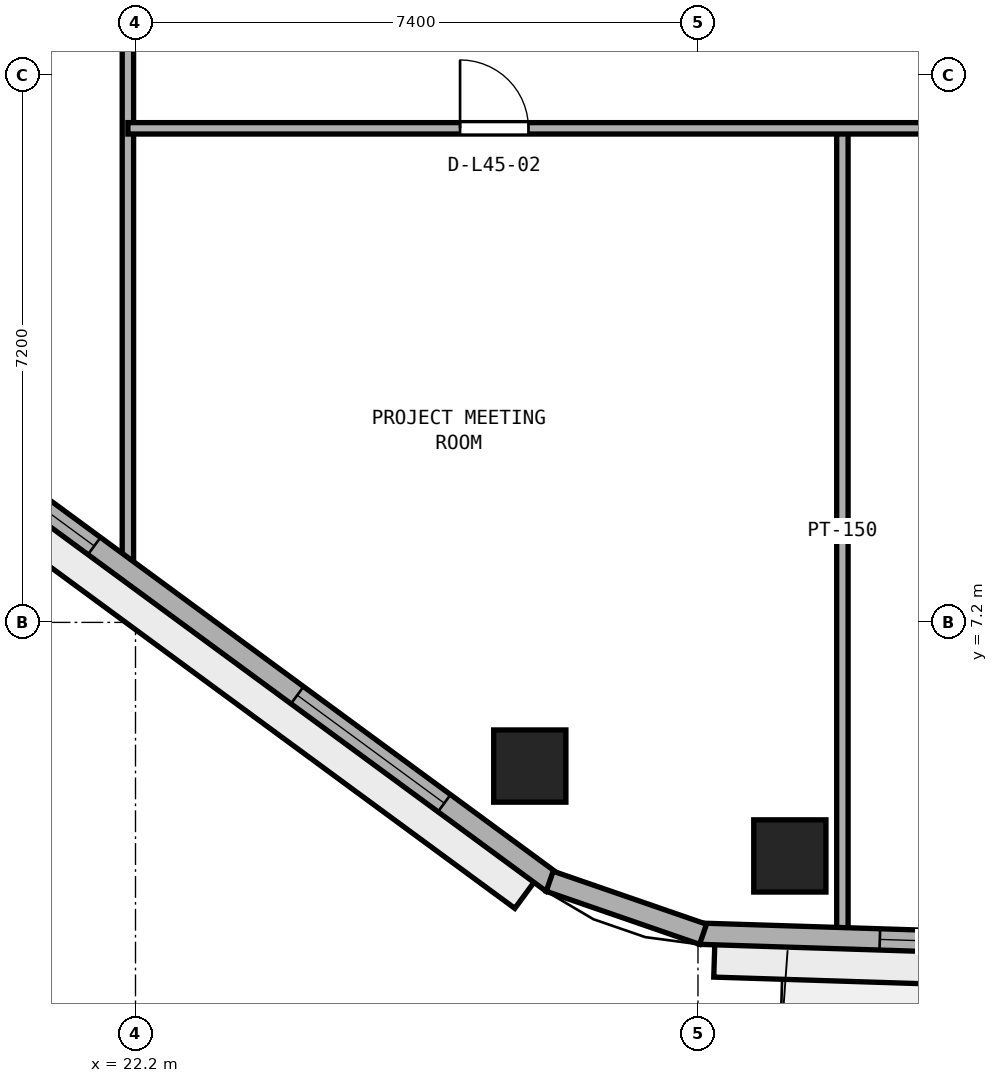
"""IFC4 building model, lengths in metres.
Left out: names, types, materials, properties, quantities, classifications, styles, units other than length and angle.
Written with IfcOpenShell. Run it as: python <this file> out.ifc"""

import sys

from ifc_helpers import new_model, si_unit, direction, frame, frame_2d, origin, origin_2d, place, context, subcontext, project, spatial, rectangle, extrude, element, fill, save


model = new_model("IFC4")
c1 = context("Model", 3, precision=1e-05, world=origin(), true_north=direction((0.0, 1.0)))
c2 = subcontext(c1, "Body", "Model", "MODEL_VIEW")
j1 = project(units=[si_unit("LENGTHUNIT", "METRE"), si_unit("PLANEANGLEUNIT", "RADIAN")], contexts=[c1])
p1 = place(None, origin())
s1 = spatial("IfcSite", under=j1, at=p1, CompositionType="ELEMENT")
p2 = place(p1, origin())
s2 = spatial("IfcBuilding", under=s1, at=p2, CompositionType="ELEMENT")
p3 = place(p2, frame((0.0, 0.0, 178.2)))
s3 = spatial("IfcBuildingStorey", under=s2, at=p3, CompositionType="ELEMENT", Elevation=178.2)
for number, where, z_axis, x_axis in (
    (1, (30.809, 4.127, 0.0), (0.0, 0.0, 1.0), (1.0, 0.0, 0.0)),
    (2, (27.387, 5.31, 0.0), (0.0, 0.0, 1.0), (1.0, 0.0, 0.0)),
):
    element("IfcColumn", number, at=place(p3, frame(where, z_axis=z_axis, x_axis=x_axis)), inside=s3, PredefinedType="COLUMN", context=c2, shape_type="SweptSolid", body=[
        extrude(rectangle(XDim=0.95, YDim=0.95, at=origin_2d()), origin(), (0.0, 0.0, 1.0), 3.8),
    ])
p4 = place(p3, frame((31.5, 3.11, 0.0), z_axis=(0.0, 0.0, 1.0), x_axis=(0.0, 1.0, 0.0)))
e3 = element("IfcWall", 3, at=p4, inside=s3, PredefinedType="PARTITIONING", context=c2, shape_type="SweptSolid", body=[
    extrude(rectangle(XDim=10.59, YDim=0.15, at=frame_2d((5.295, 0.0))), origin(), (0.0, 0.0, 1.0), 3.54),
])
p5 = place(p3, frame((22.1, 7.846, 0.0), z_axis=(0.0, 0.0, 1.0), x_axis=(0.0, 1.0, 0.0)))
e4 = element("IfcWall", 4, at=p5, inside=s3, PredefinedType="PARTITIONING", context=c2, shape_type="SweptSolid", body=[
    extrude(rectangle(XDim=16.004, YDim=0.15, at=frame_2d((8.002, 0.0))), origin(), (0.0, 0.0, 1.0), 3.54),
])
p6 = place(p5, frame((10.359, 0.0, 0.0)))
e5 = element("IfcOpeningElement", 5, at=p6, cuts=e4, PredefinedType="OPENING", context=c2, shape_type="SweptSolid", body=[
    extrude(rectangle(XDim=0.9, YDim=2.1, at=frame_2d((0.45, 1.05))), frame((0.0, 0.085, 0.0), z_axis=(0.0, -1.0, 0.0), x_axis=(1.0, 0.0, 0.0)), (0.0, 0.0, 1.0), 0.17),
])
p7 = place(p3, frame((22.1, 13.7, 0.0), z_axis=(0.0, 0.0, 1.0), x_axis=(1.0, 0.0, 0.0)))
e6 = element("IfcWall", 6, at=p7, inside=s3, PredefinedType="PARTITIONING", context=c2, shape_type="SweptSolid", body=[
    extrude(rectangle(XDim=12.3, YDim=0.15, at=frame_2d((6.15, 0.0))), origin(), (0.0, 0.0, 1.0), 3.54),
])
p8 = place(p7, frame((4.37, 0.0, 0.0)))
e7 = element("IfcOpeningElement", 7, at=p8, cuts=e6, PredefinedType="OPENING", context=c2, shape_type="SweptSolid", body=[
    extrude(rectangle(XDim=0.9, YDim=2.1, at=frame_2d((0.45, 1.05))), frame((0.0, 0.085, 0.0), z_axis=(0.0, -1.0, 0.0), x_axis=(1.0, 0.0, 0.0)), (0.0, 0.0, 1.0), 0.17),
])
p9 = place(p3, frame((29.625, 3.104, 0.0), z_axis=(0.0, 0.0, 1.0), x_axis=(0.99949718661, -0.031707632487, 0.0)))
e8 = element("IfcWall", 8, at=p9, inside=s3, PredefinedType="STANDARD", context=c2, shape_type="SweptSolid", body=[
    extrude(rectangle(XDim=16.408, YDim=0.28, at=frame_2d((8.204, 0.0))), origin(), (0.0, 0.0, 1.0), 3.54),
])
p10 = place(p9, frame((7.654, 0.0, 0.0)))
e9 = element("IfcOpeningElement", 9, at=p10, cuts=e8, PredefinedType="OPENING", context=c2, shape_type="SweptSolid", body=[
    extrude(rectangle(XDim=1.1, YDim=2.2, at=frame_2d((0.55, 1.1))), frame((0.0, 0.15, 0.0), z_axis=(0.0, -1.0, 0.0), x_axis=(1.0, 0.0, 0.0)), (0.0, 0.0, 1.0), 0.3),
])
p11 = place(p9, frame((2.368, 0.0, 0.9)))
e10 = element("IfcOpeningElement", 10, at=p11, cuts=e8, PredefinedType="OPENING", context=c2, shape_type="SweptSolid", body=[
    extrude(rectangle(XDim=2.4, YDim=1.75, at=frame_2d((1.2, 0.875))), frame((0.0, 0.15, 0.0), z_axis=(0.0, -1.0, 0.0), x_axis=(1.0, 0.0, 0.0)), (0.0, 0.0, 1.0), 0.3),
])
p12 = place(p9, frame((12.14, 0.0, 0.9)))
e11 = element("IfcOpeningElement", 11, at=p12, cuts=e8, PredefinedType="OPENING", context=c2, shape_type="SweptSolid", body=[
    extrude(rectangle(XDim=2.4, YDim=1.75, at=frame_2d((1.2, 0.875))), frame((0.0, 0.15, 0.0), z_axis=(0.0, -1.0, 0.0), x_axis=(1.0, 0.0, 0.0)), (0.0, 0.0, 1.0), 0.3),
])
p13 = place(p3, frame((14.951, 13.134, 0.0), z_axis=(0.0, 0.0, 1.0), x_axis=(0.805804940328, -0.592181051827, 0.0)))
e12 = element("IfcWall", 12, at=p13, inside=s3, PredefinedType="STANDARD", context=c2, shape_type="SweptSolid", body=[
    extrude(rectangle(XDim=15.804, YDim=0.28, at=frame_2d((7.902, 0.0))), origin(), (0.0, 0.0, 1.0), 3.54),
])
p14 = place(p13, frame((1.767, 0.0, 0.9)))
e13 = element("IfcOpeningElement", 13, at=p14, cuts=e12, PredefinedType="OPENING", context=c2, shape_type="SweptSolid", body=[
    extrude(rectangle(XDim=2.4, YDim=1.75, at=frame_2d((1.2, 0.875))), frame((0.0, 0.15, 0.0), z_axis=(0.0, -1.0, 0.0), x_axis=(1.0, 0.0, 0.0)), (0.0, 0.0, 1.0), 0.3),
])
p15 = place(p13, frame((5.922, 0.0, 0.9)))
e14 = element("IfcOpeningElement", 14, at=p15, cuts=e12, PredefinedType="OPENING", context=c2, shape_type="SweptSolid", body=[
    extrude(rectangle(XDim=2.4, YDim=1.75, at=frame_2d((1.2, 0.875))), frame((0.0, 0.15, 0.0), z_axis=(0.0, -1.0, 0.0), x_axis=(1.0, 0.0, 0.0)), (0.0, 0.0, 1.0), 0.3),
])
p16 = place(p13, frame((11.637, 0.0, 0.9)))
e15 = element("IfcOpeningElement", 15, at=p16, cuts=e12, PredefinedType="OPENING", context=c2, shape_type="SweptSolid", body=[
    extrude(rectangle(XDim=2.4, YDim=1.75, at=frame_2d((1.2, 0.875))), frame((0.0, 0.15, 0.0), z_axis=(0.0, -1.0, 0.0), x_axis=(1.0, 0.0, 0.0)), (0.0, 0.0, 1.0), 0.3),
])
p17 = place(p3, frame((27.649, 3.794, 0.0), z_axis=(0.0, 0.0, 1.0), x_axis=(0.945149124969, -0.326639145802, 0.0)))
e16 = element("IfcWall", 16, at=p17, inside=s3, PredefinedType="STANDARD", context=c2, shape_type="SweptSolid", body=[
    extrude(rectangle(XDim=2.135, YDim=0.28, at=frame_2d((1.067, 0.0))), origin(), (0.0, 0.0, 1.0), 3.54),
])
p18 = place(p8, origin())
e17 = element("IfcDoor", 17, at=p18, inside=s3, OperationType="SINGLE_SWING_LEFT", PredefinedType="DOOR", context=c2, shape_type="SweptSolid", body=[
    extrude(rectangle(XDim=0.9, YDim=2.1, at=frame_2d((0.45, 1.05))), frame((0.0, 0.025, 0.0), z_axis=(0.0, -1.0, 0.0), x_axis=(1.0, 0.0, 0.0)), (0.0, 0.0, 1.0), 0.05),
])
fill(e7, e17)
p19 = place(p11, origin())
e18 = element("IfcWindow", 18, at=p19, inside=s3, PartitioningType="SINGLE_PANEL", PredefinedType="WINDOW", context=c2, shape_type="SweptSolid", body=[
    extrude(rectangle(XDim=2.4, YDim=1.75, at=frame_2d((1.2, 0.875))), frame((0.0, 0.03, 0.0), z_axis=(0.0, -1.0, 0.0), x_axis=(1.0, 0.0, 0.0)), (0.0, 0.0, 1.0), 0.06),
])
fill(e10, e18)
p20 = place(p15, origin())
e19 = element("IfcWindow", 19, at=p20, inside=s3, PartitioningType="SINGLE_PANEL", PredefinedType="WINDOW", context=c2, shape_type="SweptSolid", body=[
    extrude(rectangle(XDim=2.4, YDim=1.75, at=frame_2d((1.2, 0.875))), frame((0.0, 0.03, 0.0), z_axis=(0.0, -1.0, 0.0), x_axis=(1.0, 0.0, 0.0)), (0.0, 0.0, 1.0), 0.06),
])
fill(e14, e19)
p21 = place(p16, origin())
e20 = element("IfcWindow", 20, at=p21, inside=s3, PartitioningType="SINGLE_PANEL", PredefinedType="WINDOW", context=c2, shape_type="SweptSolid", body=[
    extrude(rectangle(XDim=2.4, YDim=1.75, at=frame_2d((1.2, 0.875))), frame((0.0, 0.03, 0.0), z_axis=(0.0, -1.0, 0.0), x_axis=(1.0, 0.0, 0.0)), (0.0, 0.0, 1.0), 0.06),
])
fill(e15, e20)
save(model, sys.argv[1])
